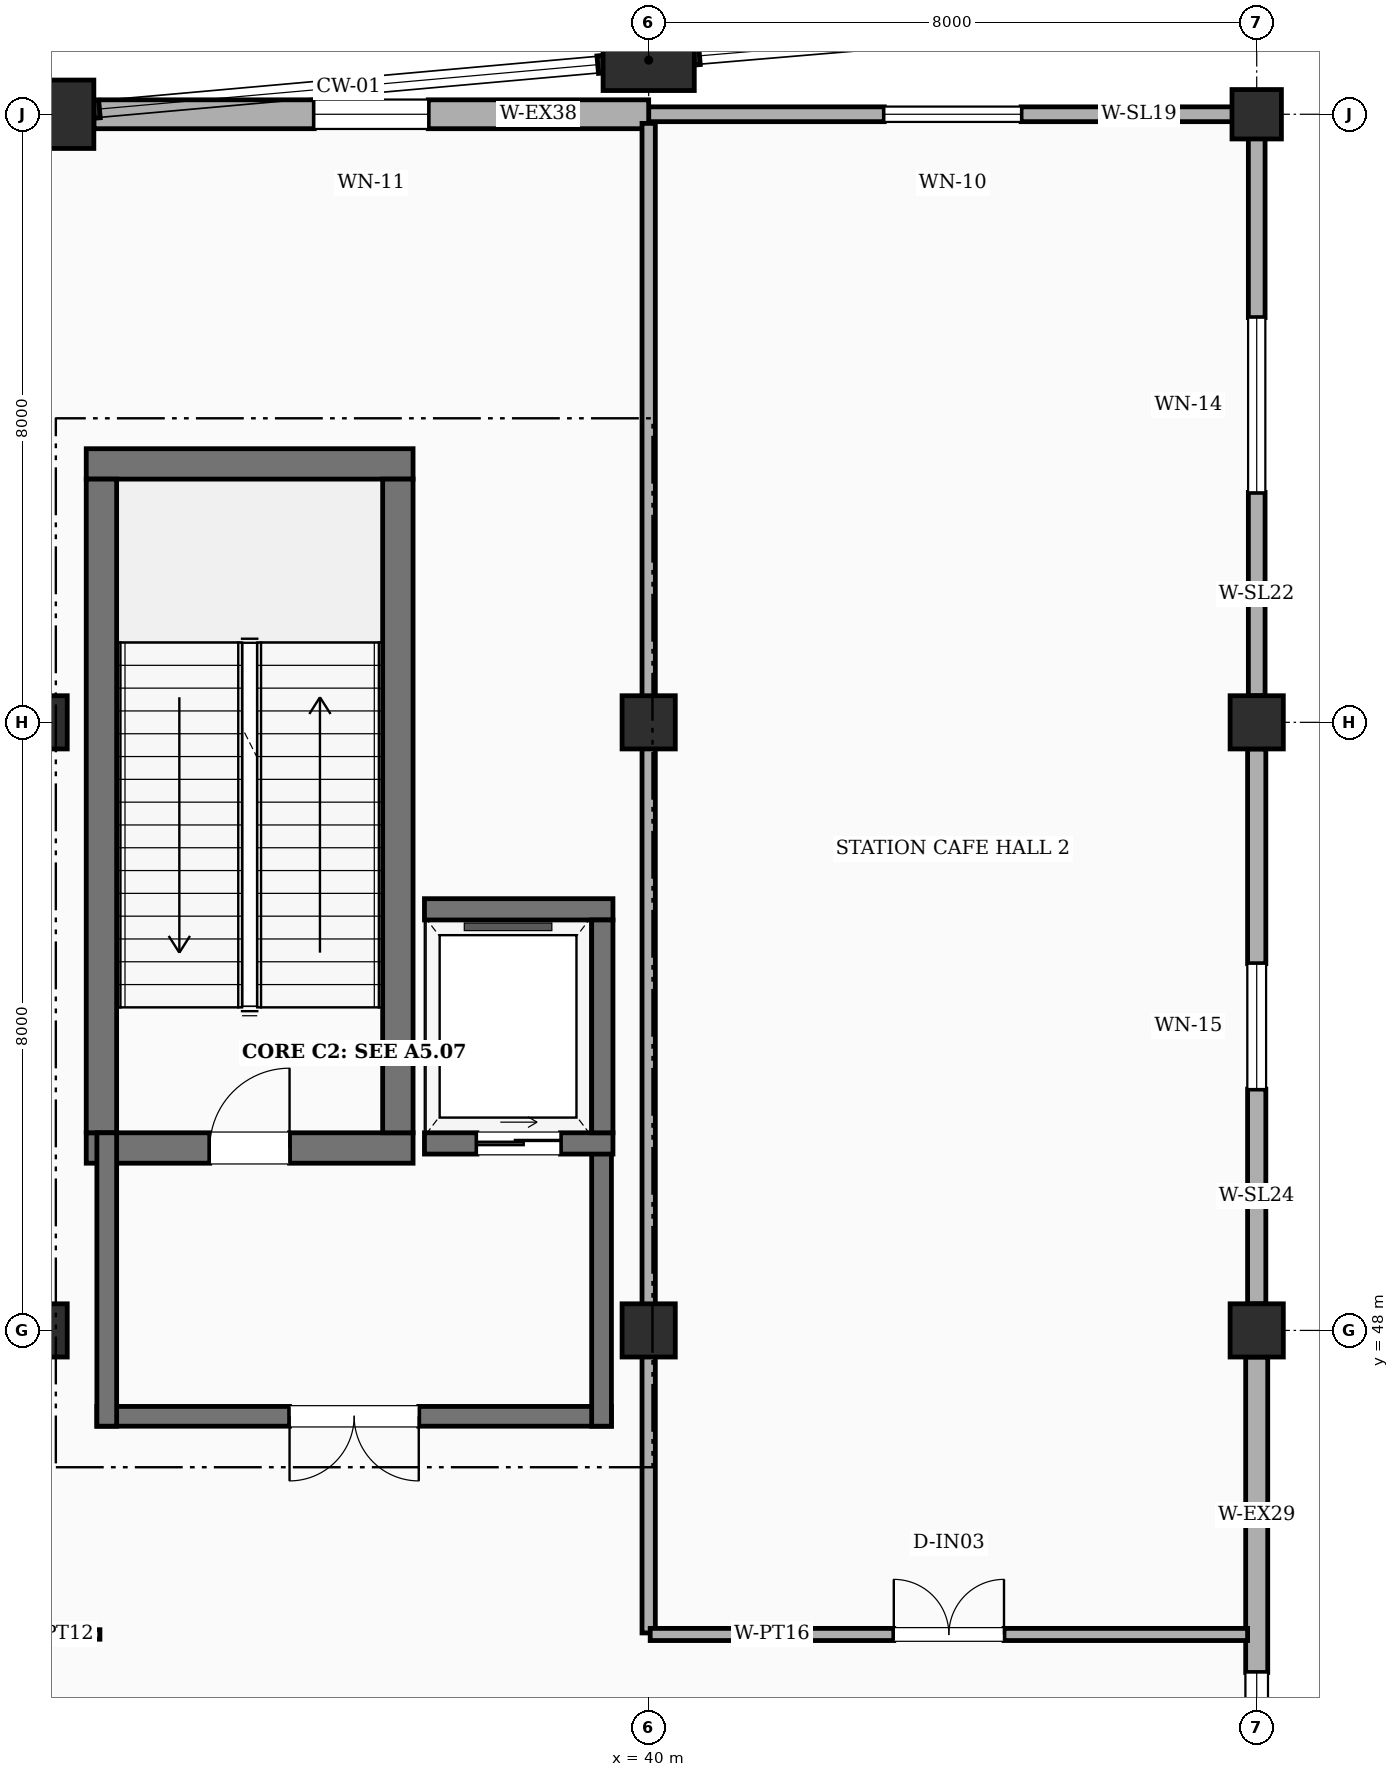
"""IFC4 building model, lengths in metres.
Left out: names, types, materials, properties, quantities, classifications, styles, units other than length and angle.
Written with IfcOpenShell. Run it as: python <this file> out.ifc"""

import sys

from ifc_helpers import new_model, si_unit, direction, frame, frame_2d, origin, origin_2d, place, context, subcontext, project, spatial, rectangle, extrude, element, fill, save


model = new_model("IFC4")
c1 = context("Model", 3, precision=1e-05, world=origin(), true_north=direction((0.0, 1.0)))
c2 = subcontext(c1, "Body", "Model", "MODEL_VIEW")
j1 = project(units=[si_unit("LENGTHUNIT", "METRE"), si_unit("PLANEANGLEUNIT", "RADIAN")], contexts=[c1])
p1 = place(None, origin())
s1 = spatial("IfcSite", under=j1, at=p1, CompositionType="ELEMENT")
p2 = place(p1, origin())
s2 = spatial("IfcBuilding", under=s1, at=p2, CompositionType="ELEMENT")
p3 = place(p2, frame((0.0, 0.0, 5.4)))
s3 = spatial("IfcBuildingStorey", under=s2, at=p3, CompositionType="ELEMENT", Elevation=5.4)
p4 = place(p3, frame((32.0, 64.0, 0.0), z_axis=(0.0, 0.0, 1.0), x_axis=(1.0, 0.0, 0.0)))
e1 = element("IfcColumn", 1, at=p4, inside=s3, PredefinedType="COLUMN", context=c2, shape_type="SweptSolid", body=[
    extrude(rectangle(XDim=1.4, YDim=0.9, at=origin_2d()), origin(), (0.0, 0.0, 1.0), 5.4),
])
p5 = place(p3, frame((40.0, 64.712, 0.0), z_axis=(0.0, 0.0, 1.0), x_axis=(1.0, 0.0, 0.0)))
e2 = element("IfcColumn", 2, at=p5, inside=s3, PredefinedType="COLUMN", context=c2, shape_type="SweptSolid", body=[
    extrude(rectangle(XDim=1.2, YDim=0.8, at=origin_2d()), origin(), (0.0, 0.0, 1.0), 5.4),
])
for number, where, z_axis, x_axis in (
    (3, (32.0, 48.0, 0.0), (0.0, 0.0, 1.0), (1.0, 0.0, 0.0)),
    (4, (32.0, 56.0, 0.0), (0.0, 0.0, 1.0), (1.0, 0.0, 0.0)),
    (5, (40.0, 48.0, 0.0), (0.0, 0.0, 1.0), (1.0, 0.0, 0.0)),
    (6, (40.0, 56.0, 0.0), (0.0, 0.0, 1.0), (1.0, 0.0, 0.0)),
    (7, (48.0, 48.0, 0.0), (0.0, 0.0, 1.0), (1.0, 0.0, 0.0)),
    (8, (48.0, 56.0, 0.0), (0.0, 0.0, 1.0), (1.0, 0.0, 0.0)),
):
    element("IfcColumn", number, at=place(p3, frame(where, z_axis=z_axis, x_axis=x_axis)), inside=s3, PredefinedType="COLUMN", context=c2, shape_type="SweptSolid", body=[
        extrude(rectangle(XDim=0.7, YDim=0.7, at=origin_2d()), origin(), (0.0, 0.0, 1.0), 5.4),
    ])
p6 = place(p3, frame((48.0, 64.0, 0.0), z_axis=(0.0, 0.0, 1.0), x_axis=(1.0, 0.0, 0.0)))
e9 = element("IfcColumn", 9, at=p6, inside=s3, PredefinedType="COLUMN", context=c2, shape_type="SweptSolid", body=[
    extrude(rectangle(XDim=0.65, YDim=0.65, at=origin_2d()), origin(), (0.0, 0.0, 1.0), 5.4),
])
p7 = place(p3, frame((48.0, 64.0, 0.0), z_axis=(0.0, 0.0, 1.0), x_axis=(-1.0, 0.0, 0.0)))
e10 = element("IfcWall", 10, at=p7, inside=s3, PredefinedType="SOLIDWALL", context=c2, shape_type="SweptSolid", body=[
    extrude(rectangle(XDim=8.0, YDim=0.195, at=frame_2d((4.0, 0.0))), origin(), (0.0, 0.0, 1.0), 5.12),
])
p8 = place(p7, frame((3.1, 0.0, 0.95)))
e11 = element("IfcOpeningElement", 11, at=p8, cuts=e10, PredefinedType="OPENING", context=c2, shape_type="SweptSolid", body=[
    extrude(rectangle(XDim=1.8, YDim=2.0, at=frame_2d((0.9, 1.0))), frame((0.0, 0.107, 0.0), z_axis=(0.0, -1.0, 0.0), x_axis=(1.0, 0.0, 0.0)), (0.0, 0.0, 1.0), 0.215),
])
p9 = place(p3, frame((40.0, 64.0, 0.0), z_axis=(0.0, 0.0, 1.0), x_axis=(-1.0, 0.0, 0.0)))
e12 = element("IfcWall", 12, at=p9, inside=s3, PredefinedType="STANDARD", context=c2, shape_type="SweptSolid", body=[
    extrude(rectangle(XDim=7.3, YDim=0.38, at=frame_2d((3.65, 0.0))), origin(), (0.0, 0.0, 1.0), 3.98),
])
p10 = place(p9, frame((2.9, 0.0, 0.95)))
e13 = element("IfcOpeningElement", 13, at=p10, cuts=e12, PredefinedType="OPENING", context=c2, shape_type="SweptSolid", body=[
    extrude(rectangle(XDim=1.5, YDim=1.8, at=frame_2d((0.75, 0.9))), frame((0.0, 0.2, 0.0), z_axis=(0.0, -1.0, 0.0), x_axis=(1.0, 0.0, 0.0)), (0.0, 0.0, 1.0), 0.4),
])
p11 = place(p3, frame((48.0, 40.35, 0.0), z_axis=(0.0, 0.0, 1.0), x_axis=(0.0, 1.0, 0.0)))
e14 = element("IfcWall", 14, at=p11, inside=s3, PredefinedType="STANDARD", context=c2, shape_type="SweptSolid", body=[
    extrude(rectangle(XDim=7.3, YDim=0.29, at=frame_2d((3.65, 0.0))), origin(), (0.0, 0.0, 1.0), 4.48),
])
p12 = place(p11, frame((0.85, 0.0, 0.95)))
e15 = element("IfcOpeningElement", 15, at=p12, cuts=e14, PredefinedType="OPENING", context=c2, shape_type="SweptSolid", body=[
    extrude(rectangle(XDim=2.3, YDim=1.8, at=frame_2d((1.15, 0.9))), frame((0.0, 0.155, 0.0), z_axis=(0.0, -1.0, 0.0), x_axis=(1.0, 0.0, 0.0)), (0.0, 0.0, 1.0), 0.31),
])
p13 = place(p3, frame((48.0, 48.35, 0.0), z_axis=(0.0, 0.0, 1.0), x_axis=(0.0, 1.0, 0.0)))
e16 = element("IfcWall", 16, at=p13, inside=s3, PredefinedType="SOLIDWALL", context=c2, shape_type="SweptSolid", body=[
    extrude(rectangle(XDim=7.3, YDim=0.24, at=frame_2d((3.65, 0.0))), origin(), (0.0, 0.0, 1.0), 4.48),
])
p14 = place(p13, frame((2.825, 0.0, 0.95)))
e17 = element("IfcOpeningElement", 17, at=p14, cuts=e16, PredefinedType="OPENING", context=c2, shape_type="SweptSolid", body=[
    extrude(rectangle(XDim=1.65, YDim=1.8, at=frame_2d((0.825, 0.9))), frame((0.0, 0.13, 0.0), z_axis=(0.0, -1.0, 0.0), x_axis=(1.0, 0.0, 0.0)), (0.0, 0.0, 1.0), 0.26),
])
p15 = place(p3, frame((48.0, 56.35, 0.0), z_axis=(0.0, 0.0, 1.0), x_axis=(0.0, 1.0, 0.0)))
e18 = element("IfcWall", 18, at=p15, inside=s3, PredefinedType="SOLIDWALL", context=c2, shape_type="SweptSolid", body=[
    extrude(rectangle(XDim=7.65, YDim=0.22, at=frame_2d((3.825, 0.0))), origin(), (0.0, 0.0, 1.0), 4.48),
])
p16 = place(p15, frame((2.675, 0.0, 0.95)))
e19 = element("IfcOpeningElement", 19, at=p16, cuts=e18, PredefinedType="OPENING", context=c2, shape_type="SweptSolid", body=[
    extrude(rectangle(XDim=2.3, YDim=1.8, at=frame_2d((1.15, 0.9))), frame((0.0, 0.12, 0.0), z_axis=(0.0, -1.0, 0.0), x_axis=(1.0, 0.0, 0.0)), (0.0, 0.0, 1.0), 0.24),
])
p17 = place(p3, frame((32.6, 50.4, 0.0), z_axis=(0.0, 0.0, 1.0), x_axis=(1.0, 0.0, 0.0)))
e20 = element("IfcWall", 20, at=p17, inside=s3, PredefinedType="SHEAR", context=c2, shape_type="SweptSolid", body=[
    extrude(rectangle(XDim=4.3, YDim=0.4, at=frame_2d((2.15, 0.0))), origin(), (0.0, 0.0, 1.0), 5.4),
])
p18 = place(p17, frame((1.625, 0.0, 0.0)))
e21 = element("IfcOpeningElement", 21, at=p18, cuts=e20, PredefinedType="OPENING", context=c2, shape_type="SweptSolid", body=[
    extrude(rectangle(XDim=1.05, YDim=2.15, at=frame_2d((0.525, 1.075))), frame((0.0, 0.21, 0.0), z_axis=(0.0, -1.0, 0.0), x_axis=(1.0, 0.0, 0.0)), (0.0, 0.0, 1.0), 0.42),
])
p19 = place(p3, frame((32.6, 59.4, 0.0), z_axis=(0.0, 0.0, 1.0), x_axis=(1.0, 0.0, 0.0)))
e22 = element("IfcWall", 22, at=p19, inside=s3, PredefinedType="SHEAR", context=c2, shape_type="SweptSolid", body=[
    extrude(rectangle(XDim=4.3, YDim=0.4, at=frame_2d((2.15, 0.0))), origin(), (0.0, 0.0, 1.0), 5.4),
])
for number, where, z_axis, x_axis in (
    (23, (32.8, 50.6, 0.0), (0.0, 0.0, 1.0), (0.0, 1.0, 0.0)),
    (24, (36.7, 50.6, 0.0), (0.0, 0.0, 1.0), (0.0, 1.0, 0.0)),
):
    element("IfcWall", number, at=place(p3, frame(where, z_axis=z_axis, x_axis=x_axis)), inside=s3, PredefinedType="SHEAR", context=c2, shape_type="SweptSolid", body=[
        extrude(rectangle(XDim=8.6, YDim=0.4, at=frame_2d((4.3, 0.0))), origin(), (0.0, 0.0, 1.0), 5.4),
    ])
p20 = place(p3, frame((39.51, 46.87, 0.0), z_axis=(0.0, 0.0, 1.0), x_axis=(-1.0, 0.0, 0.0)))
e25 = element("IfcWall", 25, at=p20, inside=s3, PredefinedType="SHEAR", context=c2, shape_type="SweptSolid", body=[
    extrude(rectangle(XDim=6.77, YDim=0.26, at=frame_2d((3.385, 0.0))), origin(), (0.0, 0.0, 1.0), 5.4),
])
p21 = place(p20, frame((2.535, 0.0, 0.0)))
e26 = element("IfcOpeningElement", 26, at=p21, cuts=e25, PredefinedType="OPENING", context=c2, shape_type="SweptSolid", body=[
    extrude(rectangle(XDim=1.7, YDim=2.2, at=frame_2d((0.85, 1.1))), frame((0.0, 0.14, 0.0), z_axis=(0.0, -1.0, 0.0), x_axis=(1.0, 0.0, 0.0)), (0.0, 0.0, 1.0), 0.28),
])
for number, where, z_axis, x_axis in (
    (27, (32.87, 46.74, 0.0), (0.0, 0.0, 1.0), (0.0, 1.0, 0.0)),
    (28, (39.38, 46.74, 0.0), (0.0, 0.0, 1.0), (0.0, 1.0, 0.0)),
):
    element("IfcWall", number, at=place(p3, frame(where, z_axis=z_axis, x_axis=x_axis)), inside=s3, PredefinedType="SHEAR", context=c2, shape_type="SweptSolid", body=[
        extrude(rectangle(XDim=3.86, YDim=0.26, at=frame_2d((1.93, 0.0))), origin(), (0.0, 0.0, 1.0), 5.4),
    ])
p22 = place(p3, frame((37.05, 50.46, 0.0), z_axis=(0.0, 0.0, 1.0), x_axis=(1.0, 0.0, 0.0)))
e29 = element("IfcWall", 29, at=p22, inside=s3, PredefinedType="SHEAR", context=c2, shape_type="SweptSolid", body=[
    extrude(rectangle(XDim=2.48, YDim=0.28, at=frame_2d((1.24, 0.0))), origin(), (0.0, 0.0, 1.0), 5.4),
])
p23 = place(p22, frame((0.69, 0.0, 0.0)))
e30 = element("IfcOpeningElement", 30, at=p23, cuts=e29, PredefinedType="OPENING", context=c2, shape_type="SweptSolid", body=[
    extrude(rectangle(XDim=1.1, YDim=2.15, at=frame_2d((0.55, 1.075))), frame((0.0, 0.15, 0.0), z_axis=(0.0, -1.0, 0.0), x_axis=(1.0, 0.0, 0.0)), (0.0, 0.0, 1.0), 0.3),
])
p24 = place(p3, frame((37.05, 53.54, 0.0), z_axis=(0.0, 0.0, 1.0), x_axis=(1.0, 0.0, 0.0)))
e31 = element("IfcWall", 31, at=p24, inside=s3, PredefinedType="SHEAR", context=c2, shape_type="SweptSolid", body=[
    extrude(rectangle(XDim=2.48, YDim=0.28, at=frame_2d((1.24, 0.0))), origin(), (0.0, 0.0, 1.0), 5.4),
])
p25 = place(p3, frame((39.39, 50.6, 0.0), z_axis=(0.0, 0.0, 1.0), x_axis=(0.0, 1.0, 0.0)))
e32 = element("IfcWall", 32, at=p25, inside=s3, PredefinedType="SHEAR", context=c2, shape_type="SweptSolid", body=[
    extrude(rectangle(XDim=2.8, YDim=0.28, at=frame_2d((1.4, 0.0))), origin(), (0.0, 0.0, 1.0), 5.4),
])
p26 = place(p3, frame((31.62, 44.0, 0.0), z_axis=(0.0, 0.0, 1.0), x_axis=(1.0, 0.0, 0.0)))
e33 = element("IfcWall", 33, at=p26, inside=s3, PredefinedType="PARTITIONING", context=c2, shape_type="SweptSolid", body=[
    extrude(rectangle(XDim=1.16, YDim=0.125, at=frame_2d((0.58, 0.0))), origin(), (0.0, 0.0, 1.0), 4.39),
])
p27 = place(p3, frame((40.0, 44.02, 0.0), z_axis=(0.0, 0.0, 1.0), x_axis=(0.0, 1.0, 0.0)))
e34 = element("IfcWall", 34, at=p27, inside=s3, PredefinedType="PARTITIONING", context=c2, shape_type="SweptSolid", body=[
    extrude(rectangle(XDim=19.86, YDim=0.175, at=frame_2d((9.93, 0.0))), origin(), (0.0, 0.0, 1.0), 4.39),
])
p28 = place(p3, frame((40.02, 44.0, 0.0), z_axis=(0.0, 0.0, 1.0), x_axis=(1.0, 0.0, 0.0)))
e35 = element("IfcWall", 35, at=p28, inside=s3, PredefinedType="PARTITIONING", context=c2, shape_type="SweptSolid", body=[
    extrude(rectangle(XDim=7.86, YDim=0.16, at=frame_2d((3.93, 0.0))), origin(), (0.0, 0.0, 1.0), 4.39),
])
p29 = place(p28, frame((3.205, 0.0, 0.0)))
e36 = element("IfcOpeningElement", 36, at=p29, cuts=e35, PredefinedType="OPENING", context=c2, shape_type="SweptSolid", body=[
    extrude(rectangle(XDim=1.45, YDim=2.2, at=frame_2d((0.725, 1.1))), frame((0.0, 0.09, 0.0), z_axis=(0.0, -1.0, 0.0), x_axis=(1.0, 0.0, 0.0)), (0.0, 0.0, 1.0), 0.18),
])
p30 = place(p8, origin())
e37 = element("IfcWindow", 37, at=p30, inside=s3, PartitioningType="SINGLE_PANEL", PredefinedType="WINDOW", context=c2, shape_type="SweptSolid", body=[
    extrude(rectangle(XDim=1.8, YDim=2.0, at=frame_2d((0.9, 1.0))), frame((0.0, 0.03, 0.0), z_axis=(0.0, -1.0, 0.0), x_axis=(1.0, 0.0, 0.0)), (0.0, 0.0, 1.0), 0.06),
])
fill(e11, e37)
p31 = place(p10, origin())
e38 = element("IfcWindow", 38, at=p31, inside=s3, PartitioningType="SINGLE_PANEL", PredefinedType="WINDOW", context=c2, shape_type="SweptSolid", body=[
    extrude(rectangle(XDim=1.5, YDim=1.8, at=frame_2d((0.75, 0.9))), frame((0.0, 0.03, 0.0), z_axis=(0.0, -1.0, 0.0), x_axis=(1.0, 0.0, 0.0)), (0.0, 0.0, 1.0), 0.06),
])
fill(e13, e38)
p32 = place(p12, origin())
e39 = element("IfcWindow", 39, at=p32, inside=s3, PartitioningType="SINGLE_PANEL", PredefinedType="WINDOW", context=c2, shape_type="SweptSolid", body=[
    extrude(rectangle(XDim=2.3, YDim=1.8, at=frame_2d((1.15, 0.9))), frame((0.0, 0.03, 0.0), z_axis=(0.0, -1.0, 0.0), x_axis=(1.0, 0.0, 0.0)), (0.0, 0.0, 1.0), 0.06),
])
fill(e15, e39)
p33 = place(p14, origin())
e40 = element("IfcWindow", 40, at=p33, inside=s3, PartitioningType="SINGLE_PANEL", PredefinedType="WINDOW", context=c2, shape_type="SweptSolid", body=[
    extrude(rectangle(XDim=1.65, YDim=1.8, at=frame_2d((0.825, 0.9))), frame((0.0, 0.03, 0.0), z_axis=(0.0, -1.0, 0.0), x_axis=(1.0, 0.0, 0.0)), (0.0, 0.0, 1.0), 0.06),
])
fill(e17, e40)
p34 = place(p16, origin())
e41 = element("IfcWindow", 41, at=p34, inside=s3, PartitioningType="SINGLE_PANEL", PredefinedType="WINDOW", context=c2, shape_type="SweptSolid", body=[
    extrude(rectangle(XDim=2.3, YDim=1.8, at=frame_2d((1.15, 0.9))), frame((0.0, 0.03, 0.0), z_axis=(0.0, -1.0, 0.0), x_axis=(1.0, 0.0, 0.0)), (0.0, 0.0, 1.0), 0.06),
])
fill(e19, e41)
p35 = place(p18, origin())
e42 = element("IfcDoor", 42, at=p35, inside=s3, OperationType="SINGLE_SWING_RIGHT", PredefinedType="DOOR", context=c2, shape_type="SweptSolid", body=[
    extrude(rectangle(XDim=1.05, YDim=2.15, at=frame_2d((0.525, 1.075))), frame((0.0, 0.025, 0.0), z_axis=(0.0, -1.0, 0.0), x_axis=(1.0, 0.0, 0.0)), (0.0, 0.0, 1.0), 0.05),
])
fill(e21, e42)
p36 = place(p21, origin())
e43 = element("IfcDoor", 43, at=p36, inside=s3, OperationType="DOUBLE_DOOR_SINGLE_SWING", PredefinedType="DOOR", context=c2, shape_type="SweptSolid", body=[
    extrude(rectangle(XDim=1.7, YDim=2.2, at=frame_2d((0.85, 1.1))), frame((0.0, 0.025, 0.0), z_axis=(0.0, -1.0, 0.0), x_axis=(1.0, 0.0, 0.0)), (0.0, 0.0, 1.0), 0.05),
])
fill(e26, e43)
p37 = place(p23, origin())
e44 = element("IfcDoor", 44, at=p37, inside=s3, OperationType="SLIDING_TO_LEFT", PredefinedType="DOOR", context=c2, shape_type="SweptSolid", body=[
    extrude(rectangle(XDim=1.1, YDim=2.15, at=frame_2d((0.55, 1.075))), frame((0.0, 0.025, 0.0), z_axis=(0.0, -1.0, 0.0), x_axis=(1.0, 0.0, 0.0)), (0.0, 0.0, 1.0), 0.05),
])
fill(e30, e44)
p38 = place(p29, origin())
e45 = element("IfcDoor", 45, at=p38, inside=s3, OperationType="DOUBLE_DOOR_SINGLE_SWING", PredefinedType="DOOR", context=c2, shape_type="SweptSolid", body=[
    extrude(rectangle(XDim=1.45, YDim=2.2, at=frame_2d((0.725, 1.1))), frame((0.0, 0.025, 0.0), z_axis=(0.0, -1.0, 0.0), x_axis=(1.0, 0.0, 0.0)), (0.0, 0.0, 1.0), 0.05),
])
fill(e36, e45)
save(model, sys.argv[1])
